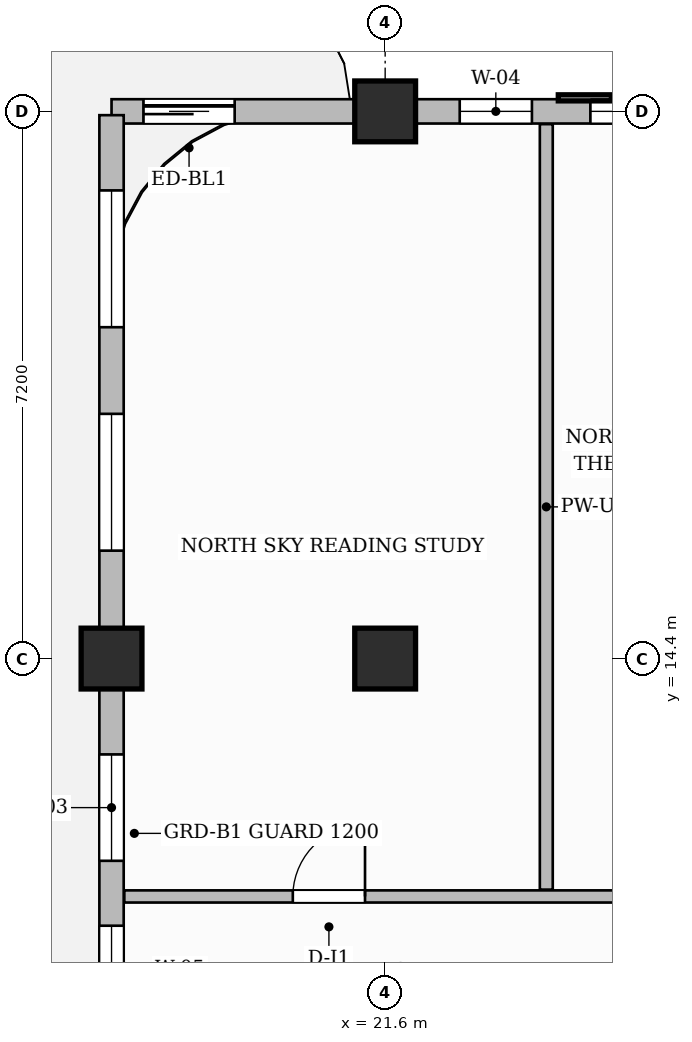
"""IFC4 building model, lengths in metres.
Left out: names, types, materials, properties, quantities, classifications, styles, units other than length and angle.
Written with IfcOpenShell. Run it as: python <this file> out.ifc"""

import sys

from ifc_helpers import new_model, si_unit, direction, frame, frame_2d, origin, origin_2d, place, context, subcontext, project, spatial, rectangle, extrude, source, transform, mapped, element, fill, save


model = new_model("IFC4")
c1 = context("Model", 3, precision=1e-05, world=origin(), true_north=direction((0.0, 1.0)))
c2 = subcontext(c1, "Body", "Model", "MODEL_VIEW")
j1 = project(units=[si_unit("LENGTHUNIT", "METRE"), si_unit("PLANEANGLEUNIT", "RADIAN")], contexts=[c1])
p1 = place(None, origin())
s1 = spatial("IfcSite", under=j1, at=p1, CompositionType="ELEMENT")
p2 = place(p1, origin())
s2 = spatial("IfcBuilding", under=s1, at=p2, CompositionType="ELEMENT")
p3 = place(p2, frame((0.0, 0.0, 271.2)))
s3 = spatial("IfcBuildingStorey", under=s2, at=p3, CompositionType="ELEMENT", Elevation=271.2)
m1 = source(origin(), c2, "Body", "SweptSolid", [
    extrude(rectangle(XDim=0.8, YDim=0.8, at=origin_2d()), origin(), (0.0, 0.0, 1.0), 3.85),
])
for number, where, z_axis, x_axis in (
    (1, (21.6, 14.4, 0.0), (0.0, 0.0, 1.0), (1.0, 0.0, 0.0)),
    (2, (21.6, 21.6, 0.0), (0.0, 0.0, 1.0), (1.0, 0.0, 0.0)),
    (3, (18.0, 14.4, 0.0), (0.0, 0.0, 1.0), (1.0, 0.0, 0.0)),
):
    element("IfcColumn", number, at=place(p3, frame(where, z_axis=z_axis, x_axis=x_axis)), inside=s3, PredefinedType="COLUMN", context=c2, shape_type="MappedRepresentation", body=[
        mapped(m1, transform((0.0, 0.0, 0.0), scale=1.0)),
    ])
p4 = place(p3, frame((18.168, 11.27, 0.0), z_axis=(0.0, 0.0, 1.0), x_axis=(1.0, 0.0, 0.0)))
e4 = element("IfcWall", 4, at=p4, inside=s3, PredefinedType="PARTITIONING", context=c2, shape_type="SweptSolid", body=[
    extrude(rectangle(XDim=11.942, YDim=0.16, at=frame_2d((5.971, 0.0))), origin(), (0.0, 0.0, 1.0), 3.6),
])
p5 = place(p4, frame((2.217, 0.0, 0.0)))
e5 = element("IfcOpeningElement", 5, at=p5, cuts=e4, PredefinedType="OPENING", context=c2, shape_type="SweptSolid", body=[
    extrude(rectangle(XDim=0.95, YDim=2.15, at=frame_2d((0.475, 1.075))), frame((0.0, 0.09, 0.0), z_axis=(0.0, -1.0, 0.0), x_axis=(1.0, 0.0, 0.0)), (0.0, 0.0, 1.0), 0.18),
])
p6 = place(p4, frame((6.557, 0.0, 0.0)))
e6 = element("IfcOpeningElement", 6, at=p6, cuts=e4, PredefinedType="OPENING", context=c2, shape_type="SweptSolid", body=[
    extrude(rectangle(XDim=0.95, YDim=2.15, at=frame_2d((0.475, 1.075))), frame((0.0, 0.09, 0.0), z_axis=(0.0, -1.0, 0.0), x_axis=(1.0, 0.0, 0.0)), (0.0, 0.0, 1.0), 0.18),
])
p7 = place(p4, frame((9.572, 0.0, 0.0)))
e7 = element("IfcOpeningElement", 7, at=p7, cuts=e4, PredefinedType="OPENING", context=c2, shape_type="SweptSolid", body=[
    extrude(rectangle(XDim=1.4, YDim=2.35, at=frame_2d((0.7, 1.175))), frame((0.0, 0.09, 0.0), z_axis=(0.0, -1.0, 0.0), x_axis=(1.0, 0.0, 0.0)), (0.0, 0.0, 1.0), 0.18),
])
p8 = place(p3, frame((23.72, 11.36, 0.0), z_axis=(0.0, 0.0, 1.0), x_axis=(0.0, 1.0, 0.0)))
e8 = element("IfcWall", 8, at=p8, inside=s3, PredefinedType="PARTITIONING", context=c2, shape_type="SweptSolid", body=[
    extrude(rectangle(XDim=10.072, YDim=0.17, at=frame_2d((5.036, 0.0))), origin(), (0.0, 0.0, 1.0), 3.6),
])
p9 = place(p3, frame((18.0, 21.6, 0.0), z_axis=(0.0, 0.0, 1.0), x_axis=(1.0, 0.0, 0.0)))
e9 = element("IfcWall", 9, at=p9, inside=s3, PredefinedType="SOLIDWALL", context=c2, shape_type="SweptSolid", body=[
    extrude(rectangle(XDim=31.8, YDim=0.32, at=frame_2d((15.9, 0.0))), origin(), (0.0, 0.0, 1.0), 3.185),
])
p10 = place(p9, frame((0.42, 0.0, 0.0)))
e10 = element("IfcOpeningElement", 10, at=p10, cuts=e9, PredefinedType="OPENING", context=c2, shape_type="SweptSolid", body=[
    extrude(rectangle(XDim=1.2, YDim=2.2, at=frame_2d((0.6, 1.1))), frame((0.0, 0.17, 0.0), z_axis=(0.0, -1.0, 0.0), x_axis=(1.0, 0.0, 0.0)), (0.0, 0.0, 1.0), 0.34),
])
p11 = place(p9, frame((4.581, 0.0, 0.8)))
e11 = element("IfcOpeningElement", 11, at=p11, cuts=e9, PredefinedType="OPENING", context=c2, shape_type="SweptSolid", body=[
    extrude(rectangle(XDim=0.95, YDim=1.75, at=frame_2d((0.475, 0.875))), frame((0.0, 0.17, 0.0), z_axis=(0.0, -1.0, 0.0), x_axis=(1.0, 0.0, 0.0)), (0.0, 0.0, 1.0), 0.34),
])
p12 = place(p9, frame((6.3, 0.0, 0.8)))
e12 = element("IfcOpeningElement", 12, at=p12, cuts=e9, PredefinedType="OPENING", context=c2, shape_type="SweptSolid", body=[
    extrude(rectangle(XDim=1.8, YDim=1.85, at=frame_2d((0.9, 0.925))), frame((0.0, 0.17, 0.0), z_axis=(0.0, -1.0, 0.0), x_axis=(1.0, 0.0, 0.0)), (0.0, 0.0, 1.0), 0.34),
])
p13 = place(p9, frame((8.869, 0.0, 0.8)))
e13 = element("IfcOpeningElement", 13, at=p13, cuts=e9, PredefinedType="OPENING", context=c2, shape_type="SweptSolid", body=[
    extrude(rectangle(XDim=0.95, YDim=1.75, at=frame_2d((0.475, 0.875))), frame((0.0, 0.17, 0.0), z_axis=(0.0, -1.0, 0.0), x_axis=(1.0, 0.0, 0.0)), (0.0, 0.0, 1.0), 0.34),
])
p14 = place(p9, frame((13.101, 0.0, 0.8)))
e14 = element("IfcOpeningElement", 14, at=p14, cuts=e9, PredefinedType="OPENING", context=c2, shape_type="SweptSolid", body=[
    extrude(rectangle(XDim=1.8, YDim=1.85, at=frame_2d((0.9, 0.925))), frame((0.0, 0.17, 0.0), z_axis=(0.0, -1.0, 0.0), x_axis=(1.0, 0.0, 0.0)), (0.0, 0.0, 1.0), 0.34),
])
p15 = place(p9, frame((18.125, 0.0, 0.8)))
e15 = element("IfcOpeningElement", 15, at=p15, cuts=e9, PredefinedType="OPENING", context=c2, shape_type="SweptSolid", body=[
    extrude(rectangle(XDim=1.8, YDim=1.85, at=frame_2d((0.9, 0.925))), frame((0.0, 0.17, 0.0), z_axis=(0.0, -1.0, 0.0), x_axis=(1.0, 0.0, 0.0)), (0.0, 0.0, 1.0), 0.34),
])
p16 = place(p9, frame((20.875, 0.0, 0.8)))
e16 = element("IfcOpeningElement", 16, at=p16, cuts=e9, PredefinedType="OPENING", context=c2, shape_type="SweptSolid", body=[
    extrude(rectangle(XDim=1.8, YDim=1.85, at=frame_2d((0.9, 0.925))), frame((0.0, 0.17, 0.0), z_axis=(0.0, -1.0, 0.0), x_axis=(1.0, 0.0, 0.0)), (0.0, 0.0, 1.0), 0.34),
])
p17 = place(p9, frame((25.475, 0.0, 0.8)))
e17 = element("IfcOpeningElement", 17, at=p17, cuts=e9, PredefinedType="OPENING", context=c2, shape_type="SweptSolid", body=[
    extrude(rectangle(XDim=1.8, YDim=1.85, at=frame_2d((0.9, 0.925))), frame((0.0, 0.17, 0.0), z_axis=(0.0, -1.0, 0.0), x_axis=(1.0, 0.0, 0.0)), (0.0, 0.0, 1.0), 0.34),
])
p18 = place(p9, frame((28.525, 0.0, 0.8)))
e18 = element("IfcOpeningElement", 18, at=p18, cuts=e9, PredefinedType="OPENING", context=c2, shape_type="SweptSolid", body=[
    extrude(rectangle(XDim=1.8, YDim=1.85, at=frame_2d((0.9, 0.925))), frame((0.0, 0.17, 0.0), z_axis=(0.0, -1.0, 0.0), x_axis=(1.0, 0.0, 0.0)), (0.0, 0.0, 1.0), 0.34),
])
p19 = place(p3, frame((18.0, 0.05, 0.0), z_axis=(0.0, 0.0, 1.0), x_axis=(0.0, 1.0, 0.0)))
e19 = element("IfcWall", 19, at=p19, inside=s3, PredefinedType="SOLIDWALL", context=c2, shape_type="SweptSolid", body=[
    extrude(rectangle(XDim=21.5, YDim=0.32, at=frame_2d((10.75, 0.0))), origin(), (0.0, 0.0, 1.0), 3.6),
])
p20 = place(p19, frame((0.99, 0.0, 0.8)))
e20 = element("IfcOpeningElement", 20, at=p20, cuts=e19, PredefinedType="OPENING", context=c2, shape_type="SweptSolid", body=[
    extrude(rectangle(XDim=1.8, YDim=1.85, at=frame_2d((0.9, 0.925))), frame((0.0, 0.17, 0.0), z_axis=(0.0, -1.0, 0.0), x_axis=(1.0, 0.0, 0.0)), (0.0, 0.0, 1.0), 0.34),
])
p21 = place(p19, frame((3.93, 0.0, 0.8)))
e21 = element("IfcOpeningElement", 21, at=p21, cuts=e19, PredefinedType="OPENING", context=c2, shape_type="SweptSolid", body=[
    extrude(rectangle(XDim=1.8, YDim=1.85, at=frame_2d((0.9, 0.925))), frame((0.0, 0.17, 0.0), z_axis=(0.0, -1.0, 0.0), x_axis=(1.0, 0.0, 0.0)), (0.0, 0.0, 1.0), 0.34),
])
p22 = place(p19, frame((8.146, 0.0, 0.8)))
e22 = element("IfcOpeningElement", 22, at=p22, cuts=e19, PredefinedType="OPENING", context=c2, shape_type="SweptSolid", body=[
    extrude(rectangle(XDim=0.95, YDim=1.75, at=frame_2d((0.475, 0.875))), frame((0.0, 0.17, 0.0), z_axis=(0.0, -1.0, 0.0), x_axis=(1.0, 0.0, 0.0)), (0.0, 0.0, 1.0), 0.34),
])
p23 = place(p19, frame((9.685, 0.0, 0.8)))
e23 = element("IfcOpeningElement", 23, at=p23, cuts=e19, PredefinedType="OPENING", context=c2, shape_type="SweptSolid", body=[
    extrude(rectangle(XDim=1.15, YDim=1.8, at=frame_2d((0.575, 0.9))), frame((0.0, 0.17, 0.0), z_axis=(0.0, -1.0, 0.0), x_axis=(1.0, 0.0, 0.0)), (0.0, 0.0, 1.0), 0.34),
])
p24 = place(p19, frame((11.689, 0.0, 0.8)))
e24 = element("IfcOpeningElement", 24, at=p24, cuts=e19, PredefinedType="OPENING", context=c2, shape_type="SweptSolid", body=[
    extrude(rectangle(XDim=1.4, YDim=1.85, at=frame_2d((0.7, 0.925))), frame((0.0, 0.17, 0.0), z_axis=(0.0, -1.0, 0.0), x_axis=(1.0, 0.0, 0.0)), (0.0, 0.0, 1.0), 0.34),
])
p25 = place(p19, frame((15.77, 0.0, 0.8)))
e25 = element("IfcOpeningElement", 25, at=p25, cuts=e19, PredefinedType="OPENING", context=c2, shape_type="SweptSolid", body=[
    extrude(rectangle(XDim=1.8, YDim=1.85, at=frame_2d((0.9, 0.925))), frame((0.0, 0.17, 0.0), z_axis=(0.0, -1.0, 0.0), x_axis=(1.0, 0.0, 0.0)), (0.0, 0.0, 1.0), 0.34),
])
p26 = place(p19, frame((18.71, 0.0, 0.8)))
e26 = element("IfcOpeningElement", 26, at=p26, cuts=e19, PredefinedType="OPENING", context=c2, shape_type="SweptSolid", body=[
    extrude(rectangle(XDim=1.8, YDim=1.85, at=frame_2d((0.9, 0.925))), frame((0.0, 0.17, 0.0), z_axis=(0.0, -1.0, 0.0), x_axis=(1.0, 0.0, 0.0)), (0.0, 0.0, 1.0), 0.34),
])
m2 = source(origin(), c2, "Body", "SweptSolid", [
    extrude(rectangle(XDim=0.95, YDim=2.15, at=frame_2d((0.475, 1.075))), frame((0.0, 0.025, 0.0), z_axis=(0.0, -1.0, 0.0), x_axis=(1.0, 0.0, 0.0)), (0.0, 0.0, 1.0), 0.05),
])
p27 = place(p5, origin())
e27 = element("IfcDoor", 27, at=p27, inside=s3, OperationType="SINGLE_SWING_RIGHT", PredefinedType="DOOR", context=c2, shape_type="MappedRepresentation", body=[
    mapped(m2, transform((0.0, 0.0, 0.0), scale=1.0)),
])
fill(e5, e27)
m3 = source(origin(), c2, "Body", "SweptSolid", [
    extrude(rectangle(XDim=1.2, YDim=2.2, at=frame_2d((0.6, 1.1))), frame((0.0, 0.025, 0.0), z_axis=(0.0, -1.0, 0.0), x_axis=(1.0, 0.0, 0.0)), (0.0, 0.0, 1.0), 0.05),
])
p28 = place(p10, origin())
e28 = element("IfcDoor", 28, at=p28, inside=s3, OperationType="SLIDING_TO_LEFT", PredefinedType="DOOR", context=c2, shape_type="MappedRepresentation", body=[
    mapped(m3, transform((0.0, 0.0, 0.0), scale=1.0)),
])
fill(e10, e28)
m4 = source(origin(), c2, "Body", "SweptSolid", [
    extrude(rectangle(XDim=0.95, YDim=1.75, at=frame_2d((0.475, 0.875))), frame((0.0, 0.03, 0.0), z_axis=(0.0, -1.0, 0.0), x_axis=(1.0, 0.0, 0.0)), (0.0, 0.0, 1.0), 0.06),
])
p29 = place(p11, origin())
e29 = element("IfcWindow", 29, at=p29, inside=s3, PartitioningType="SINGLE_PANEL", PredefinedType="WINDOW", context=c2, shape_type="MappedRepresentation", body=[
    mapped(m4, transform((0.0, 0.0, 0.0), scale=1.0)),
])
fill(e11, e29)
m5 = source(origin(), c2, "Body", "SweptSolid", [
    extrude(rectangle(XDim=1.8, YDim=1.85, at=frame_2d((0.9, 0.925))), frame((0.0, 0.03, 0.0), z_axis=(0.0, -1.0, 0.0), x_axis=(1.0, 0.0, 0.0)), (0.0, 0.0, 1.0), 0.06),
])
p30 = place(p12, origin())
e30 = element("IfcWindow", 30, at=p30, inside=s3, PartitioningType="DOUBLE_PANEL_VERTICAL", PredefinedType="WINDOW", context=c2, shape_type="MappedRepresentation", body=[
    mapped(m5, transform((0.0, 0.0, 0.0), scale=1.0)),
])
fill(e12, e30)
m6 = source(origin(), c2, "Body", "SweptSolid", [
    extrude(rectangle(XDim=1.15, YDim=1.8, at=frame_2d((0.575, 0.9))), frame((0.0, 0.03, 0.0), z_axis=(0.0, -1.0, 0.0), x_axis=(1.0, 0.0, 0.0)), (0.0, 0.0, 1.0), 0.06),
])
p31 = place(p23, origin())
e31 = element("IfcWindow", 31, at=p31, inside=s3, PartitioningType="SINGLE_PANEL", PredefinedType="WINDOW", context=c2, shape_type="MappedRepresentation", body=[
    mapped(m6, transform((0.0, 0.0, 0.0), scale=1.0)),
])
fill(e23, e31)
m7 = source(origin(), c2, "Body", "SweptSolid", [
    extrude(rectangle(XDim=1.4, YDim=1.85, at=frame_2d((0.7, 0.925))), frame((0.0, 0.03, 0.0), z_axis=(0.0, -1.0, 0.0), x_axis=(1.0, 0.0, 0.0)), (0.0, 0.0, 1.0), 0.06),
])
p32 = place(p24, origin())
e32 = element("IfcWindow", 32, at=p32, inside=s3, PartitioningType="SINGLE_PANEL", PredefinedType="WINDOW", context=c2, shape_type="MappedRepresentation", body=[
    mapped(m7, transform((0.0, 0.0, 0.0), scale=1.0)),
])
fill(e24, e32)
p33 = place(p25, origin())
e33 = element("IfcWindow", 33, at=p33, inside=s3, PartitioningType="DOUBLE_PANEL_VERTICAL", PredefinedType="WINDOW", context=c2, shape_type="MappedRepresentation", body=[
    mapped(m5, transform((0.0, 0.0, 0.0), scale=1.0)),
])
fill(e25, e33)
p34 = place(p26, origin())
e34 = element("IfcWindow", 34, at=p34, inside=s3, PartitioningType="DOUBLE_PANEL_VERTICAL", PredefinedType="WINDOW", context=c2, shape_type="MappedRepresentation", body=[
    mapped(m5, transform((0.0, 0.0, 0.0), scale=1.0)),
])
fill(e26, e34)
save(model, sys.argv[1])
